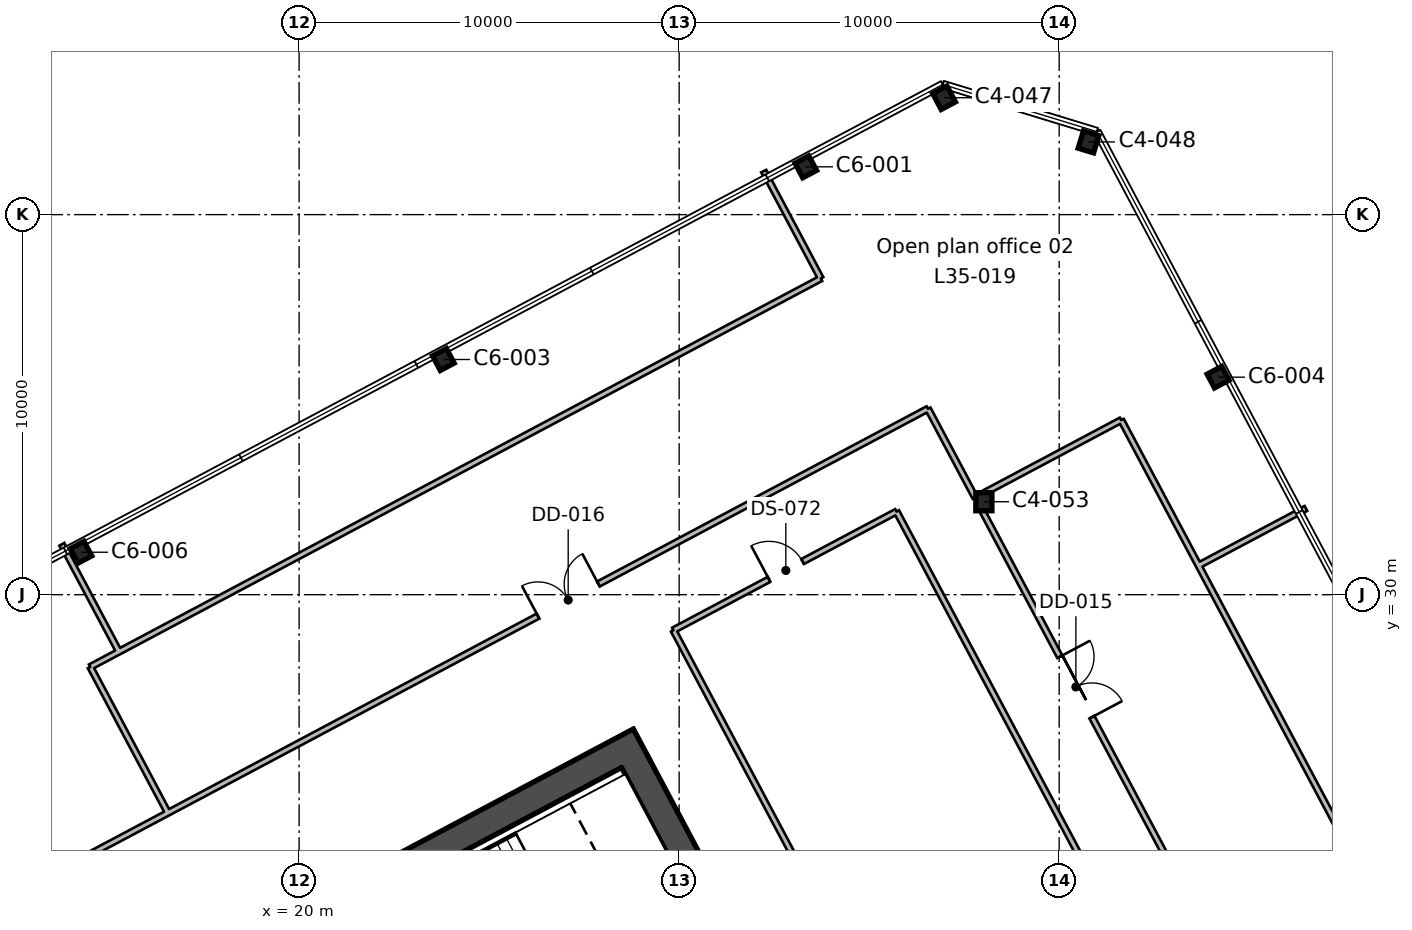
"""IFC4 building model, lengths in metres.
Left out: names, types, materials, properties, quantities, classifications, styles, units other than length and angle.
Written with IfcOpenShell. Run it as: python <this file> out.ifc"""

import sys

from ifc_helpers import new_model, si_unit, direction, frame, frame_2d, origin, origin_2d, place, context, subcontext, project, spatial, rectangle, i_section, extrude, element, fill, save


model = new_model("IFC4")
c1 = context("Model", 3, precision=1e-05, world=origin(), true_north=direction((0.0, 1.0)))
c2 = subcontext(c1, "Body", "Model", "MODEL_VIEW")
j1 = project(units=[si_unit("LENGTHUNIT", "METRE"), si_unit("PLANEANGLEUNIT", "RADIAN")], contexts=[c1])
p1 = place(None, origin())
s1 = spatial("IfcSite", under=j1, at=p1, CompositionType="ELEMENT")
p2 = place(p1, origin())
s2 = spatial("IfcBuilding", under=s1, at=p2, CompositionType="ELEMENT")
p3 = place(p2, frame((0.0, 0.0, 166.2)))
s3 = spatial("IfcBuildingStorey", under=s2, at=p3, CompositionType="ELEMENT", Elevation=166.2)
p4 = place(p3, frame((14.261, 31.117, 0.0), z_axis=(0.0, 0.0, 1.0), x_axis=(-0.882947592859, -0.469471562786, 0.0)))
e1 = element("IfcColumn", 1, at=p4, inside=s3, PredefinedType="COLUMN", context=c2, shape_type="SweptSolid", body=[
    extrude(i_section(OverallWidth=0.412, OverallDepth=0.434, WebThickness=0.036, FlangeThickness=0.057, FilletRadius=0.015, at=origin_2d()), origin(), (0.0, 0.0, 1.0), 4.0),
])
p5 = place(p3, frame((38.018, 32.446, 0.0), z_axis=(0.0, 0.0, 1.0), x_axis=(1.0, 0.0, 0.0)))
e2 = element("IfcColumn", 2, at=p5, inside=s3, PredefinedType="COLUMN", context=c2, shape_type="SweptSolid", body=[
    extrude(i_section(OverallWidth=0.424, OverallDepth=0.475, WebThickness=0.048, FlangeThickness=0.077, FilletRadius=0.015, at=origin_2d()), origin(), (0.0, 0.0, 1.0), 4.0),
])
for number, where, z_axis, x_axis in (
    (3, (44.181, 35.723, 0.0), (0.0, 0.0, 1.0), (-0.469, 0.883, 0.0)),
    (4, (23.796, 36.188, 0.0), (0.0, 0.0, 1.0), (-0.883, -0.469, 0.0)),
    (5, (33.332, 41.258, 0.0), (0.0, 0.0, 1.0), (-0.883, -0.469, 0.0)),
):
    element("IfcColumn", number, at=place(p3, frame(where, z_axis=z_axis, x_axis=x_axis)), inside=s3, PredefinedType="COLUMN", context=c2, shape_type="SweptSolid", body=[
        extrude(i_section(OverallWidth=0.412, OverallDepth=0.434, WebThickness=0.036, FlangeThickness=0.057, FilletRadius=0.015, at=origin_2d()), origin(), (0.0, 0.0, 1.0), 4.0),
    ])
for number, where, z_axis, x_axis in (
    (6, (40.772, 41.913, 0.0), (0.0, 0.0, 1.0), (-0.956, 0.292, 0.0)),
    (7, (36.971, 43.076, 0.0), (0.0, 0.0, 1.0), (-0.883, -0.469, 0.0)),
):
    element("IfcColumn", number, at=place(p3, frame(where, z_axis=z_axis, x_axis=x_axis)), inside=s3, PredefinedType="COLUMN", context=c2, shape_type="SweptSolid", body=[
        extrude(i_section(OverallWidth=0.424, OverallDepth=0.475, WebThickness=0.048, FlangeThickness=0.077, FilletRadius=0.015, at=origin_2d()), origin(), (0.0, 0.0, 1.0), 4.0),
    ])
p6 = place(p3, frame((37.713, 8.896, 0.0), z_axis=(0.0, 0.0, 1.0), x_axis=(-0.469469918705, 0.88294846703, 0.0)))
e8 = element("IfcWall", 8, at=p6, inside=s3, PredefinedType="SHEAR", context=c2, shape_type="SweptSolid", body=[
    extrude(rectangle(XDim=19.7, YDim=0.75, at=frame_2d((9.85, 0.0))), origin(), (0.0, 0.0, 1.0), 4.0),
])
p7 = place(p6, frame((10.45, 0.0, 0.0)))
e9 = element("IfcOpeningElement", 9, at=p7, cuts=e8, PredefinedType="OPENING", context=c2, shape_type="SweptSolid", body=[
    extrude(rectangle(XDim=2.4, YDim=2.4, at=frame_2d((1.2, 1.2))), frame((0.0, 0.385, 0.0), z_axis=(0.0, -1.0, 0.0), x_axis=(1.0, 0.0, 0.0)), (0.0, 0.0, 1.0), 0.77),
])
p8 = place(p3, frame((10.474, 16.3, 0.0), z_axis=(0.0, 0.0, 1.0), x_axis=(0.88295010195, 0.469466843842, 0.0)))
e10 = element("IfcWall", 10, at=p8, inside=s3, PredefinedType="SHEAR", context=c2, shape_type="SweptSolid", body=[
    extrude(rectangle(XDim=20.2, YDim=0.75, at=frame_2d((10.1, 0.0))), origin(), (0.0, 0.0, 1.0), 4.0),
])
p9 = place(p3, frame((0.0, 15.46, 0.0), z_axis=(0.0, 0.0, 1.0), x_axis=(0.882949722977, 0.469467556594, 0.0)))
e11 = element("IfcWall", 11, at=p9, inside=s3, PredefinedType="PARTITIONING", context=c2, shape_type="SweptSolid", body=[
    extrude(rectangle(XDim=20.021, YDim=0.15, at=frame_2d((10.01, 0.0))), origin(), (0.0, 0.0, 1.0), 3.64),
])
p10 = place(p9, frame((9.55, 0.0, 0.0)))
e12 = element("IfcOpeningElement", 12, at=p10, cuts=e11, PredefinedType="OPENING", context=c2, shape_type="SweptSolid", body=[
    extrude(rectangle(XDim=1.0, YDim=2.1, at=frame_2d((0.5, 1.05))), frame((0.0, 0.085, 0.0), z_axis=(0.0, -1.0, 0.0), x_axis=(1.0, 0.0, 0.0)), (0.0, 0.0, 1.0), 0.17),
])
p11 = place(p3, frame((15.761, 25.739, 0.0), z_axis=(0.0, 0.0, 1.0), x_axis=(0.469318416257, -0.883029005278, 0.0)))
e13 = element("IfcWall", 13, at=p11, inside=s3, PredefinedType="PARTITIONING", context=c2, shape_type="SweptSolid", body=[
    extrude(rectangle(XDim=1.677, YDim=0.15, at=frame_2d((0.839, 0.0))), origin(), (0.0, 0.0, 1.0), 3.64),
])
p12 = place(p3, frame((13.757, 31.325, 0.0), z_axis=(0.0, 0.0, 1.0), x_axis=(0.469685095616, -0.882834022315, 0.0)))
e14 = element("IfcWall", 14, at=p12, inside=s3, PredefinedType="PARTITIONING", context=c2, shape_type="SweptSolid", body=[
    extrude(rectangle(XDim=3.2, YDim=0.15, at=frame_2d((1.6, 0.0))), origin(), (0.0, 0.0, 1.0), 3.64),
])
p13 = place(p3, frame((15.258, 28.499, 0.0), z_axis=(0.0, 0.0, 1.0), x_axis=(0.882939918194, 0.469485996447, 0.0)))
e15 = element("IfcWall", 15, at=p13, inside=s3, PredefinedType="PARTITIONING", context=c2, shape_type="SweptSolid", body=[
    extrude(rectangle(XDim=20.919, YDim=0.15, at=frame_2d((10.459, 0.0))), origin(), (0.0, 0.0, 1.0), 3.64),
])
p14 = place(p3, frame((33.728, 38.32, 0.0), z_axis=(0.0, 0.0, 1.0), x_axis=(-0.469320691295, 0.883027796121, 0.0)))
e16 = element("IfcWall", 16, at=p14, inside=s3, PredefinedType="PARTITIONING", context=c2, shape_type="SweptSolid", body=[
    extrude(rectangle(XDim=3.2, YDim=0.15, at=frame_2d((1.6, 0.0))), origin(), (0.0, 0.0, 1.0), 3.64),
])
p15 = place(p3, frame((15.761, 25.739, 0.0), z_axis=(0.0, 0.0, 1.0), x_axis=(-0.469469065188, 0.882948920851, 0.0)))
e17 = element("IfcWall", 17, at=p15, inside=s3, PredefinedType="PARTITIONING", context=c2, shape_type="SweptSolid", body=[
    extrude(rectangle(XDim=2.673, YDim=0.15, at=frame_2d((1.336, 0.0))), origin(), (0.0, 0.0, 1.0), 3.64),
])
p16 = place(p3, frame((14.506, 28.099, 0.0), z_axis=(0.0, 0.0, 1.0), x_axis=(0.882907789101, 0.469546415113, 0.0)))
e18 = element("IfcWall", 18, at=p16, inside=s3, PredefinedType="PARTITIONING", context=c2, shape_type="SweptSolid", body=[
    extrude(rectangle(XDim=0.852, YDim=0.15, at=frame_2d((0.426, 0.0))), origin(), (0.0, 0.0, 1.0), 3.64),
])
p17 = place(p3, frame((37.789, 32.556, 0.0), z_axis=(0.0, 0.0, 1.0), x_axis=(-0.469764435481, 0.882791807369, 0.0)))
e19 = element("IfcWall", 19, at=p17, inside=s3, PredefinedType="PARTITIONING", context=c2, shape_type="SweptSolid", body=[
    extrude(rectangle(XDim=2.646, YDim=0.15, at=frame_2d((1.323, 0.0))), origin(), (0.0, 0.0, 1.0), 3.64),
])
p18 = place(p3, frame((17.677, 24.859, 0.0), z_axis=(0.0, 0.0, 1.0), x_axis=(0.882951785412, 0.469463677655, 0.0)))
e20 = element("IfcWall", 20, at=p18, inside=s3, PredefinedType="PARTITIONING", context=c2, shape_type="SweptSolid", body=[
    extrude(rectangle(XDim=21.372, YDim=0.15, at=frame_2d((10.686, 0.0))), origin(), (0.0, 0.0, 1.0), 3.64),
])
p19 = place(p18, frame((9.75, 0.0, 0.0)))
e21 = element("IfcOpeningElement", 21, at=p19, cuts=e20, PredefinedType="OPENING", context=c2, shape_type="SweptSolid", body=[
    extrude(rectangle(XDim=1.8, YDim=2.1, at=frame_2d((0.9, 1.05))), frame((0.0, 0.085, 0.0), z_axis=(0.0, -1.0, 0.0), x_axis=(1.0, 0.0, 0.0)), (0.0, 0.0, 1.0), 0.17),
])
p20 = place(p3, frame((37.974, 32.209, 0.0), z_axis=(0.0, 0.0, 1.0), x_axis=(0.469434985691, -0.882967040274, 0.0)))
e22 = element("IfcWall", 22, at=p20, inside=s3, PredefinedType="PARTITIONING", context=c2, shape_type="SweptSolid", body=[
    extrude(rectangle(XDim=10.442, YDim=0.15, at=frame_2d((5.221, 0.0))), origin(), (0.0, 0.0, 1.0), 3.64),
])
p21 = place(p20, frame((4.351, 0.0, 0.0)))
e23 = element("IfcOpeningElement", 23, at=p21, cuts=e22, PredefinedType="OPENING", context=c2, shape_type="SweptSolid", body=[
    extrude(rectangle(XDim=1.8, YDim=2.1, at=frame_2d((0.9, 1.05))), frame((0.0, 0.085, 0.0), z_axis=(0.0, -1.0, 0.0), x_axis=(1.0, 0.0, 0.0)), (0.0, 0.0, 1.0), 0.17),
])
p22 = place(p3, frame((43.641, 30.817, 0.0), z_axis=(0.0, 0.0, 1.0), x_axis=(-0.469601615988, 0.882878430058, 0.0)))
e24 = element("IfcWall", 24, at=p22, inside=s3, PredefinedType="PARTITIONING", context=c2, shape_type="SweptSolid", body=[
    extrude(rectangle(XDim=4.278, YDim=0.15, at=frame_2d((2.139, 0.0))), origin(), (0.0, 0.0, 1.0), 3.64),
])
p23 = place(p3, frame((41.632, 34.594, 0.0), z_axis=(0.0, 0.0, 1.0), x_axis=(-0.88295491585, -0.469457789984, 0.0)))
e25 = element("IfcWall", 25, at=p23, inside=s3, PredefinedType="PARTITIONING", context=c2, shape_type="SweptSolid", body=[
    extrude(rectangle(XDim=4.07, YDim=0.15, at=frame_2d((2.035, 0.0))), origin(), (0.0, 0.0, 1.0), 3.64),
])
p24 = place(p3, frame((43.641, 30.817, 0.0), z_axis=(0.0, 0.0, 1.0), x_axis=(0.469460355779, -0.882953551639, 0.0)))
e26 = element("IfcWall", 26, at=p24, inside=s3, PredefinedType="PARTITIONING", context=c2, shape_type="SweptSolid", body=[
    extrude(rectangle(XDim=25.231, YDim=0.15, at=frame_2d((12.615, 0.0))), origin(), (0.0, 0.0, 1.0), 3.64),
])
p25 = place(p3, frame((46.492, 32.27, 0.0), z_axis=(0.0, 0.0, 1.0), x_axis=(-0.883027796121, -0.469320691295, 0.0)))
e27 = element("IfcWall", 27, at=p25, inside=s3, PredefinedType="PARTITIONING", context=c2, shape_type="SweptSolid", body=[
    extrude(rectangle(XDim=3.2, YDim=0.15, at=frame_2d((1.6, 0.0))), origin(), (0.0, 0.0, 1.0), 3.64),
])
p26 = place(p3, frame((29.849, 29.065, 0.0), z_axis=(0.0, 0.0, 1.0), x_axis=(0.882917406039, 0.469528331535, 0.0)))
e28 = element("IfcWall", 28, at=p26, inside=s3, PredefinedType="PARTITIONING", context=c2, shape_type="SweptSolid", body=[
    extrude(rectangle(XDim=6.649, YDim=0.15, at=frame_2d((3.325, 0.0))), origin(), (0.0, 0.0, 1.0), 3.64),
])
p27 = place(p26, frame((2.85, 0.0, 0.0)))
e29 = element("IfcOpeningElement", 29, at=p27, cuts=e28, PredefinedType="OPENING", context=c2, shape_type="SweptSolid", body=[
    extrude(rectangle(XDim=1.0, YDim=2.1, at=frame_2d((0.5, 1.05))), frame((0.0, 0.085, 0.0), z_axis=(0.0, -1.0, 0.0), x_axis=(1.0, 0.0, 0.0)), (0.0, 0.0, 1.0), 0.17),
])
p28 = place(p3, frame((35.72, 32.187, 0.0), z_axis=(0.0, 0.0, 1.0), x_axis=(0.469474204504, -0.882946188227, 0.0)))
e30 = element("IfcWall", 30, at=p28, inside=s3, PredefinedType="PARTITIONING", context=c2, shape_type="SweptSolid", body=[
    extrude(rectangle(XDim=21.301, YDim=0.15, at=frame_2d((10.65, 0.0))), origin(), (0.0, 0.0, 1.0), 3.64),
])
p29 = place(p3, frame((39.848, 10.258, 0.0), z_axis=(0.0, 0.0, 1.0), x_axis=(-0.469434276041, 0.882967417563, 0.0)))
e31 = element("IfcWall", 31, at=p29, inside=s3, PredefinedType="PARTITIONING", context=c2, shape_type="SweptSolid", body=[
    extrude(rectangle(XDim=21.3, YDim=0.15, at=frame_2d((10.65, 0.0))), origin(), (0.0, 0.0, 1.0), 3.64),
])
p30 = place(p21, origin())
e32 = element("IfcDoor", 32, at=p30, inside=s3, OperationType="DOUBLE_DOOR_SINGLE_SWING", PredefinedType="DOOR", context=c2, shape_type="SweptSolid", body=[
    extrude(rectangle(XDim=1.8, YDim=2.1, at=frame_2d((0.9, 1.05))), frame((0.0, 0.025, 0.0), z_axis=(0.0, -1.0, 0.0), x_axis=(1.0, 0.0, 0.0)), (0.0, 0.0, 1.0), 0.05),
])
fill(e23, e32)
p31 = place(p19, origin())
e33 = element("IfcDoor", 33, at=p31, inside=s3, OperationType="DOUBLE_DOOR_SINGLE_SWING", PredefinedType="DOOR", context=c2, shape_type="SweptSolid", body=[
    extrude(rectangle(XDim=1.8, YDim=2.1, at=frame_2d((0.9, 1.05))), frame((0.0, 0.025, 0.0), z_axis=(0.0, -1.0, 0.0), x_axis=(1.0, 0.0, 0.0)), (0.0, 0.0, 1.0), 0.05),
])
fill(e21, e33)
p32 = place(p27, origin())
e34 = element("IfcDoor", 34, at=p32, inside=s3, OperationType="SINGLE_SWING_LEFT", PredefinedType="DOOR", context=c2, shape_type="SweptSolid", body=[
    extrude(rectangle(XDim=1.0, YDim=2.1, at=frame_2d((0.5, 1.05))), frame((0.0, 0.025, 0.0), z_axis=(0.0, -1.0, 0.0), x_axis=(1.0, 0.0, 0.0)), (0.0, 0.0, 1.0), 0.05),
])
fill(e29, e34)
save(model, sys.argv[1])
